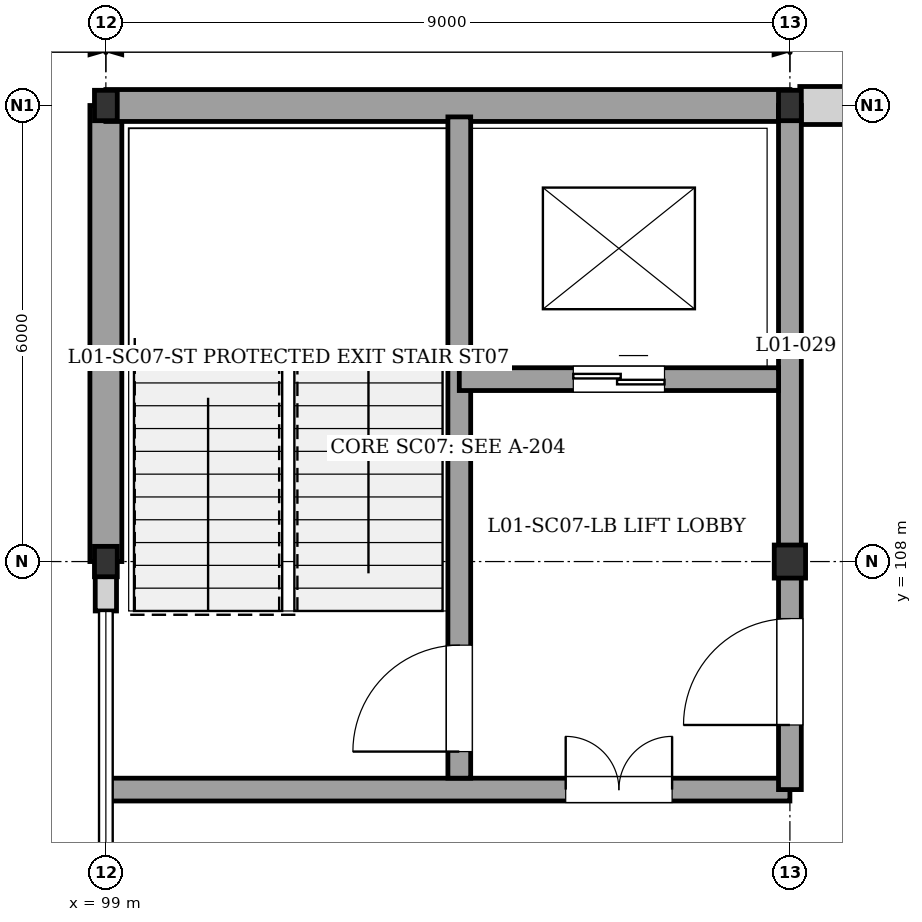
"""IFC4 building model, lengths in metres.
Left out: names, types, materials, properties, quantities, classifications, styles, units other than length and angle.
Written with IfcOpenShell. Run it as: python <this file> out.ifc"""

import sys

from ifc_helpers import new_model, si_unit, direction, frame, frame_2d, origin, origin_2d, place, context, subcontext, project, spatial, rectangle, i_section, extrude, element, fill, save


model = new_model("IFC4")
c1 = context("Model", 3, precision=1e-05, world=origin(), true_north=direction((0.0, 1.0)))
c2 = subcontext(c1, "Body", "Model", "MODEL_VIEW")
j1 = project(units=[si_unit("LENGTHUNIT", "METRE"), si_unit("PLANEANGLEUNIT", "RADIAN")], contexts=[c1])
p1 = place(None, origin())
s1 = spatial("IfcSite", under=j1, at=p1, CompositionType="ELEMENT")
p2 = place(p1, origin())
s2 = spatial("IfcBuilding", under=s1, at=p2, CompositionType="ELEMENT")
p3 = place(p2, frame((0.0, 0.0, 4.32)))
s3 = spatial("IfcBuildingStorey", under=s2, at=p3, CompositionType="ELEMENT", Elevation=4.32)
for number, where, z_axis, x_axis in (
    (1, (99.0, 108.0, 0.0), (0.0, 0.0, 1.0), (1.0, 0.0, 0.0)),
    (2, (99.0, 114.0, 0.0), (0.0, 0.0, 1.0), (1.0, 0.0, 0.0)),
):
    element("IfcColumn", number, at=place(p3, frame(where, z_axis=z_axis, x_axis=x_axis)), inside=s3, PredefinedType="COLUMN", context=c2, shape_type="SweptSolid", body=[
        extrude(i_section(OverallWidth=0.3, OverallDepth=0.4, WebThickness=0.013, FlangeThickness=0.024, at=origin_2d()), origin(), (0.0, 0.0, 1.0), 3.84),
    ])
p4 = place(p3, frame((108.0, 108.0, 0.0), z_axis=(0.0, 0.0, 1.0), x_axis=(1.0, 0.0, 0.0)))
e3 = element("IfcColumn", 3, at=p4, inside=s3, PredefinedType="COLUMN", context=c2, shape_type="SweptSolid", body=[
    extrude(i_section(OverallWidth=0.412, OverallDepth=0.435, WebThickness=0.027, FlangeThickness=0.046, at=origin_2d()), origin(), (0.0, 0.0, 1.0), 3.84),
])
p5 = place(p3, frame((108.0, 114.0, 0.0), z_axis=(0.0, 0.0, 1.0), x_axis=(1.0, 0.0, 0.0)))
e4 = element("IfcColumn", 4, at=p5, inside=s3, PredefinedType="COLUMN", context=c2, shape_type="SweptSolid", body=[
    extrude(i_section(OverallWidth=0.3, OverallDepth=0.4, WebThickness=0.013, FlangeThickness=0.024, at=origin_2d()), origin(), (0.0, 0.0, 1.0), 3.84),
])
p6 = place(p3, frame((99.0, 107.35, 0.0), z_axis=(0.0, 0.0, 1.0), x_axis=(0.0, 1.0, 0.0)))
e5 = element("IfcWall", 5, at=p6, inside=s3, PredefinedType="SOLIDWALL", context=c2, shape_type="SweptSolid", body=[
    extrude(rectangle(XDim=0.65, YDim=0.28, at=frame_2d((0.325, 0.0))), origin(), (0.0, 0.0, 1.0), 3.18),
])
p7 = place(p3, frame((99.0, 108.0, 0.0), z_axis=(0.0, 0.0, 1.0), x_axis=(0.0, 1.0, 0.0)))
e6 = element("IfcWall", 6, at=p7, inside=s3, PredefinedType="SOLIDWALL", context=c2, shape_type="SweptSolid", body=[
    extrude(rectangle(XDim=6.0, YDim=0.42, at=frame_2d((3.0, 0.0))), origin(), (0.0, 0.0, 1.0), 3.6),
])
p8 = place(p3, frame((99.0, 114.0, 0.0), z_axis=(0.0, 0.0, 1.0), x_axis=(1.0, 0.0, 0.0)))
e7 = element("IfcWall", 7, at=p8, inside=s3, PredefinedType="SOLIDWALL", context=c2, shape_type="SweptSolid", body=[
    extrude(rectangle(XDim=9.0, YDim=0.42, at=frame_2d((4.5, 0.0))), origin(), (0.0, 0.0, 1.0), 3.6),
])
p9 = place(p3, frame((108.13, 114.0, 0.0), z_axis=(0.0, 0.0, 1.0), x_axis=(1.0, 0.0, 0.0)))
e8 = element("IfcWall", 8, at=p9, inside=s3, PredefinedType="SOLIDWALL", context=c2, shape_type="SweptSolid", body=[
    extrude(rectangle(XDim=8.87, YDim=0.5, at=frame_2d((4.435, 0.0))), origin(), (0.0, 0.0, 1.0), 3.18),
])
p10 = place(p3, frame((99.0, 105.0, 0.0), z_axis=(0.0, 0.0, 1.0), x_axis=(1.0, 0.0, 0.0)))
e9 = element("IfcWall", 9, at=p10, inside=s3, PredefinedType="SHEAR", context=c2, shape_type="SweptSolid", body=[
    extrude(rectangle(XDim=9.0, YDim=0.3, at=frame_2d((4.5, 0.0))), origin(), (0.0, 0.0, 1.0), 3.6),
])
p11 = place(p10, frame((6.05, 0.0, 0.0)))
e10 = element("IfcOpeningElement", 10, at=p11, cuts=e9, PredefinedType="OPENING", context=c2, shape_type="SweptSolid", body=[
    extrude(rectangle(XDim=1.4, YDim=2.02, at=frame_2d((0.7, 1.01))), frame((0.0, 0.16, 0.0), z_axis=(0.0, -1.0, 0.0), x_axis=(1.0, 0.0, 0.0)), (0.0, 0.0, 1.0), 0.32),
])
p12 = place(p3, frame((108.0, 105.0, 0.0), z_axis=(0.0, 0.0, 1.0), x_axis=(0.0, 1.0, 0.0)))
e11 = element("IfcWall", 11, at=p12, inside=s3, PredefinedType="SHEAR", context=c2, shape_type="SweptSolid", body=[
    extrude(rectangle(XDim=9.0, YDim=0.3, at=frame_2d((4.5, 0.0))), origin(), (0.0, 0.0, 1.0), 3.6),
])
p13 = place(p12, frame((0.85, 0.0, 0.0)))
e12 = element("IfcOpeningElement", 12, at=p13, cuts=e11, PredefinedType="OPENING", context=c2, shape_type="SweptSolid", body=[
    extrude(rectangle(XDim=1.4, YDim=2.02, at=frame_2d((0.7, 1.01))), frame((0.0, 0.16, 0.0), z_axis=(0.0, -1.0, 0.0), x_axis=(1.0, 0.0, 0.0)), (0.0, 0.0, 1.0), 0.32),
])
p14 = place(p3, frame((103.65, 105.15, 0.0), z_axis=(0.0, 0.0, 1.0), x_axis=(0.0, 1.0, 0.0)))
e13 = element("IfcWall", 13, at=p14, inside=s3, PredefinedType="SHEAR", context=c2, shape_type="SweptSolid", body=[
    extrude(rectangle(XDim=8.7, YDim=0.3, at=frame_2d((4.35, 0.0))), origin(), (0.0, 0.0, 1.0), 3.6),
])
p15 = place(p14, frame((0.35, 0.0, 0.0)))
e14 = element("IfcOpeningElement", 14, at=p15, cuts=e13, PredefinedType="OPENING", context=c2, shape_type="SweptSolid", body=[
    extrude(rectangle(XDim=1.4, YDim=2.02, at=frame_2d((0.7, 1.01))), frame((0.0, 0.16, 0.0), z_axis=(0.0, -1.0, 0.0), x_axis=(1.0, 0.0, 0.0)), (0.0, 0.0, 1.0), 0.32),
])
p16 = place(p3, frame((103.65, 110.4, 0.0), z_axis=(0.0, 0.0, 1.0), x_axis=(1.0, 0.0, 0.0)))
e15 = element("IfcWall", 15, at=p16, inside=s3, PredefinedType="SHEAR", context=c2, shape_type="SweptSolid", body=[
    extrude(rectangle(XDim=4.2, YDim=0.3, at=frame_2d((2.1, 0.0))), origin(), (0.0, 0.0, 1.0), 3.6),
])
p17 = place(p16, frame((1.5, 0.0, 0.0)))
e16 = element("IfcOpeningElement", 16, at=p17, cuts=e15, PredefinedType="OPENING", context=c2, shape_type="SweptSolid", body=[
    extrude(rectangle(XDim=1.2, YDim=2.2, at=frame_2d((0.6, 1.1))), frame((0.0, 0.16, 0.0), z_axis=(0.0, -1.0, 0.0), x_axis=(1.0, 0.0, 0.0)), (0.0, 0.0, 1.0), 0.32),
])
p18 = place(p11, origin())
e17 = element("IfcDoor", 17, at=p18, inside=s3, OperationType="DOUBLE_DOOR_SINGLE_SWING", PredefinedType="DOOR", context=c2, shape_type="SweptSolid", body=[
    extrude(rectangle(XDim=1.4, YDim=2.02, at=frame_2d((0.7, 1.01))), frame((0.0, 0.025, 0.0), z_axis=(0.0, -1.0, 0.0), x_axis=(1.0, 0.0, 0.0)), (0.0, 0.0, 1.0), 0.05),
])
fill(e10, e17)
p19 = place(p13, origin())
e18 = element("IfcDoor", 18, at=p19, inside=s3, OperationType="SINGLE_SWING_LEFT", PredefinedType="DOOR", context=c2, shape_type="SweptSolid", body=[
    extrude(rectangle(XDim=1.4, YDim=2.02, at=frame_2d((0.7, 1.01))), frame((0.0, 0.025, 0.0), z_axis=(0.0, -1.0, 0.0), x_axis=(1.0, 0.0, 0.0)), (0.0, 0.0, 1.0), 0.05),
])
fill(e12, e18)
p20 = place(p15, origin())
e19 = element("IfcDoor", 19, at=p20, inside=s3, OperationType="SINGLE_SWING_LEFT", PredefinedType="DOOR", context=c2, shape_type="SweptSolid", body=[
    extrude(rectangle(XDim=1.4, YDim=2.02, at=frame_2d((0.7, 1.01))), frame((0.0, 0.025, 0.0), z_axis=(0.0, -1.0, 0.0), x_axis=(1.0, 0.0, 0.0)), (0.0, 0.0, 1.0), 0.05),
])
fill(e14, e19)
p21 = place(p17, origin())
e20 = element("IfcDoor", 20, at=p21, inside=s3, OperationType="DOUBLE_DOOR_SLIDING", PredefinedType="DOOR", context=c2, shape_type="SweptSolid", body=[
    extrude(rectangle(XDim=1.2, YDim=2.2, at=frame_2d((0.6, 1.1))), frame((0.0, 0.025, 0.0), z_axis=(0.0, -1.0, 0.0), x_axis=(1.0, 0.0, 0.0)), (0.0, 0.0, 1.0), 0.05),
])
fill(e16, e20)
save(model, sys.argv[1])
